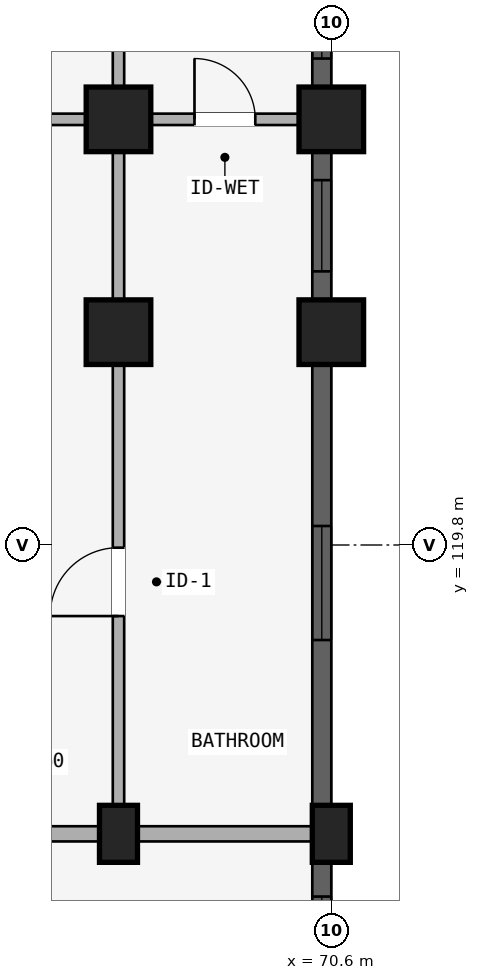
"""IFC4 building model, lengths in metres.
Left out: names, types, materials, properties, quantities, classifications, styles, units other than length and angle.
Written with IfcOpenShell. Run it as: python <this file> out.ifc"""

import sys

from ifc_helpers import new_model, si_unit, direction, frame, frame_2d, origin, origin_2d, place, context, subcontext, project, spatial, rectangle, extrude, element, fill, save


model = new_model("IFC4")
c1 = context("Model", 3, precision=1e-05, world=origin(), true_north=direction((0.0, 1.0)))
c2 = subcontext(c1, "Body", "Model", "MODEL_VIEW")
j1 = project(units=[si_unit("LENGTHUNIT", "METRE"), si_unit("PLANEANGLEUNIT", "RADIAN")], contexts=[c1])
p1 = place(None, origin())
s1 = spatial("IfcSite", under=j1, at=p1, CompositionType="ELEMENT")
p2 = place(p1, origin())
s2 = spatial("IfcBuilding", under=s1, at=p2, CompositionType="ELEMENT")
p3 = place(p2, frame((0.0, 0.0, 4.5)))
s3 = spatial("IfcBuildingStorey", under=s2, at=p3, CompositionType="ELEMENT", Elevation=4.5)
p4 = place(p3, frame((67.8, 116.0, 0.0), z_axis=(0.0, 0.0, 1.0), x_axis=(1.0, 0.0, 0.0)))
e1 = element("IfcColumn", 1, at=p4, inside=s3, PredefinedType="COLUMN", context=c2, shape_type="SweptSolid", body=[
    extrude(rectangle(XDim=0.5, YDim=0.75, at=origin_2d()), origin(), (0.0, 0.0, 1.0), 3.98),
])
for number, where, z_axis, x_axis in (
    (2, (67.8, 122.6, 0.0), (0.0, 0.0, 1.0), (1.0, 0.0, 0.0)),
    (3, (67.8, 125.4, 0.0), (0.0, 0.0, 1.0), (1.0, 0.0, 0.0)),
):
    element("IfcColumn", number, at=place(p3, frame(where, z_axis=z_axis, x_axis=x_axis)), inside=s3, PredefinedType="COLUMN", context=c2, shape_type="SweptSolid", body=[
        extrude(rectangle(XDim=0.85, YDim=0.85, at=origin_2d()), origin(), (0.0, 0.0, 1.0), 3.98),
    ])
p5 = place(p3, frame((70.6, 116.0, 0.0), z_axis=(0.0, 0.0, 1.0), x_axis=(1.0, 0.0, 0.0)))
e4 = element("IfcColumn", 4, at=p5, inside=s3, PredefinedType="COLUMN", context=c2, shape_type="SweptSolid", body=[
    extrude(rectangle(XDim=0.5, YDim=0.75, at=origin_2d()), origin(), (0.0, 0.0, 1.0), 3.98),
])
for number, where, z_axis, x_axis in (
    (5, (70.6, 122.6, 0.0), (0.0, 0.0, 1.0), (1.0, 0.0, 0.0)),
    (6, (70.6, 125.4, 0.0), (0.0, 0.0, 1.0), (1.0, 0.0, 0.0)),
):
    element("IfcColumn", number, at=place(p3, frame(where, z_axis=z_axis, x_axis=x_axis)), inside=s3, PredefinedType="COLUMN", context=c2, shape_type="SweptSolid", body=[
        extrude(rectangle(XDim=0.85, YDim=0.85, at=origin_2d()), origin(), (0.0, 0.0, 1.0), 3.98),
    ])
p6 = place(p3, frame((65.0, 116.0, 0.0), z_axis=(0.0, 0.0, 1.0), x_axis=(1.0, 0.0, 0.0)))
e7 = element("IfcWall", 7, at=p6, inside=s3, PredefinedType="STANDARD", context=c2, shape_type="SweptSolid", body=[
    extrude(rectangle(XDim=2.8, YDim=0.2, at=frame_2d((1.4, 0.0))), origin(), (0.0, 0.0, 1.0), 3.322),
])
p7 = place(p6, frame((0.9, 0.0, 0.0)))
e8 = element("IfcOpeningElement", 8, at=p7, cuts=e7, PredefinedType="OPENING", context=c2, shape_type="SweptSolid", body=[
    extrude(rectangle(XDim=1.0, YDim=2.15, at=frame_2d((0.5, 1.075))), frame((0.0, 0.11, 0.0), z_axis=(0.0, -1.0, 0.0), x_axis=(1.0, 0.0, 0.0)), (0.0, 0.0, 1.0), 0.22),
])
p8 = place(p3, frame((65.08, 125.4, 0.0), z_axis=(0.0, 0.0, 1.0), x_axis=(1.0, 0.0, 0.0)))
e9 = element("IfcWall", 9, at=p8, inside=s3, PredefinedType="PLUMBINGWALL", context=c2, shape_type="SweptSolid", body=[
    extrude(rectangle(XDim=2.64, YDim=0.15, at=frame_2d((1.32, 0.0))), origin(), (0.0, 0.0, 1.0), 3.322),
])
p9 = place(p8, frame((0.87, 0.0, 0.0)))
e10 = element("IfcOpeningElement", 10, at=p9, cuts=e9, PredefinedType="OPENING", context=c2, shape_type="SweptSolid", body=[
    extrude(rectangle(XDim=0.9, YDim=2.1, at=frame_2d((0.45, 1.05))), frame((0.0, 0.085, 0.0), z_axis=(0.0, -1.0, 0.0), x_axis=(1.0, 0.0, 0.0)), (0.0, 0.0, 1.0), 0.17),
])
p10 = place(p3, frame((67.8, 116.0, 0.0), z_axis=(0.0, 0.0, 1.0), x_axis=(1.0, 0.0, 0.0)))
e11 = element("IfcWall", 11, at=p10, inside=s3, PredefinedType="STANDARD", context=c2, shape_type="SweptSolid", body=[
    extrude(rectangle(XDim=2.8, YDim=0.2, at=frame_2d((1.4, 0.0))), origin(), (0.0, 0.0, 1.0), 3.322),
])
p11 = place(p3, frame((67.88, 125.4, 0.0), z_axis=(0.0, 0.0, 1.0), x_axis=(1.0, 0.0, 0.0)))
e12 = element("IfcWall", 12, at=p11, inside=s3, PredefinedType="PLUMBINGWALL", context=c2, shape_type="SweptSolid", body=[
    extrude(rectangle(XDim=2.64, YDim=0.15, at=frame_2d((1.32, 0.0))), origin(), (0.0, 0.0, 1.0), 3.322),
])
p12 = place(p11, frame((0.92, 0.0, 0.0)))
e13 = element("IfcOpeningElement", 13, at=p12, cuts=e12, PredefinedType="OPENING", context=c2, shape_type="SweptSolid", body=[
    extrude(rectangle(XDim=0.8, YDim=2.1, at=frame_2d((0.4, 1.05))), frame((0.0, 0.085, 0.0), z_axis=(0.0, -1.0, 0.0), x_axis=(1.0, 0.0, 0.0)), (0.0, 0.0, 1.0), 0.17),
])
p13 = place(p3, frame((67.8, 116.05, 0.0), z_axis=(0.0, 0.0, 1.0), x_axis=(0.0, 1.0, 0.0)))
e14 = element("IfcWall", 14, at=p13, inside=s3, PredefinedType="PARTITIONING", context=c2, shape_type="SweptSolid", body=[
    extrude(rectangle(XDim=6.53, YDim=0.15, at=frame_2d((3.265, 0.0))), origin(), (0.0, 0.0, 1.0), 3.322),
])
p14 = place(p13, frame((2.815, 0.0, 0.0)))
e15 = element("IfcOpeningElement", 15, at=p14, cuts=e14, PredefinedType="OPENING", context=c2, shape_type="SweptSolid", body=[
    extrude(rectangle(XDim=0.9, YDim=2.1, at=frame_2d((0.45, 1.05))), frame((0.0, 0.085, 0.0), z_axis=(0.0, -1.0, 0.0), x_axis=(1.0, 0.0, 0.0)), (0.0, 0.0, 1.0), 0.17),
])
p15 = place(p3, frame((67.8, 122.7, 0.0), z_axis=(0.0, 0.0, 1.0), x_axis=(0.0, 1.0, 0.0)))
e16 = element("IfcWall", 16, at=p15, inside=s3, PredefinedType="PARTITIONING", context=c2, shape_type="SweptSolid", body=[
    extrude(rectangle(XDim=10.82, YDim=0.15, at=frame_2d((5.41, 0.0))), origin(), (0.0, 0.0, 1.0), 3.322),
])
p16 = place(p15, frame((3.7, 0.0, 0.0)))
e17 = element("IfcOpeningElement", 17, at=p16, cuts=e16, PredefinedType="OPENING", context=c2, shape_type="SweptSolid", body=[
    extrude(rectangle(XDim=0.8, YDim=2.1, at=frame_2d((0.4, 1.05))), frame((0.0, 0.085, 0.0), z_axis=(0.0, -1.0, 0.0), x_axis=(1.0, 0.0, 0.0)), (0.0, 0.0, 1.0), 0.17),
])
p17 = place(p3, frame((70.475, 113.979, 0.0), z_axis=(0.0, 0.0, 1.0), x_axis=(0.0, 1.0, 0.0)))
e18 = element("IfcWall", 18, at=p17, inside=s3, PredefinedType="STANDARD", context=c2, shape_type="SweptSolid", body=[
    extrude(rectangle(XDim=1.643, YDim=0.25, at=frame_2d((0.822, 0.0))), origin(), (0.0, 0.0, 1.0), 3.322),
])
p18 = place(p17, frame((0.447, 0.0, 0.88)))
e19 = element("IfcOpeningElement", 19, at=p18, cuts=e18, PredefinedType="OPENING", context=c2, shape_type="SweptSolid", body=[
    extrude(rectangle(XDim=0.75, YDim=1.05, at=frame_2d((0.375, 0.525))), frame((0.0, 0.135, 0.0), z_axis=(0.0, -1.0, 0.0), x_axis=(1.0, 0.0, 0.0)), (0.0, 0.0, 1.0), 0.27),
])
p19 = place(p3, frame((70.475, 116.378, 0.0), z_axis=(0.0, 0.0, 1.0), x_axis=(0.0, 1.0, 0.0)))
e20 = element("IfcWall", 20, at=p19, inside=s3, PredefinedType="STANDARD", context=c2, shape_type="SweptSolid", body=[
    extrude(rectangle(XDim=5.802, YDim=0.25, at=frame_2d((2.901, 0.0))), origin(), (0.0, 0.0, 1.0), 3.322),
])
p20 = place(p19, frame((2.171, 0.0, 0.88)))
e21 = element("IfcOpeningElement", 21, at=p20, cuts=e20, PredefinedType="OPENING", context=c2, shape_type="SweptSolid", body=[
    extrude(rectangle(XDim=1.5, YDim=1.65, at=frame_2d((0.75, 0.825))), frame((0.0, 0.135, 0.0), z_axis=(0.0, -1.0, 0.0), x_axis=(1.0, 0.0, 0.0)), (0.0, 0.0, 1.0), 0.27),
])
p21 = place(p3, frame((70.475, 123.02, 0.0), z_axis=(0.0, 0.0, 1.0), x_axis=(0.0, 1.0, 0.0)))
e22 = element("IfcWall", 22, at=p21, inside=s3, PredefinedType="STANDARD", context=c2, shape_type="SweptSolid", body=[
    extrude(rectangle(XDim=1.96, YDim=0.25, at=frame_2d((0.98, 0.0))), origin(), (0.0, 0.0, 1.0), 3.322),
])
p22 = place(p21, frame((0.38, 0.0, 0.88)))
e23 = element("IfcOpeningElement", 23, at=p22, cuts=e22, PredefinedType="OPENING", context=c2, shape_type="SweptSolid", body=[
    extrude(rectangle(XDim=1.2, YDim=1.5, at=frame_2d((0.6, 0.75))), frame((0.0, 0.135, 0.0), z_axis=(0.0, -1.0, 0.0), x_axis=(1.0, 0.0, 0.0)), (0.0, 0.0, 1.0), 0.27),
])
p23 = place(p3, frame((70.475, 125.82, 0.0), z_axis=(0.0, 0.0, 1.0), x_axis=(0.0, 1.0, 0.0)))
e24 = element("IfcWall", 24, at=p23, inside=s3, PredefinedType="STANDARD", context=c2, shape_type="SweptSolid", body=[
    extrude(rectangle(XDim=1.96, YDim=0.25, at=frame_2d((0.98, 0.0))), origin(), (0.0, 0.0, 1.0), 3.322),
])
p24 = place(p23, frame((0.38, 0.0, 0.88)))
e25 = element("IfcOpeningElement", 25, at=p24, cuts=e24, PredefinedType="OPENING", context=c2, shape_type="SweptSolid", body=[
    extrude(rectangle(XDim=1.2, YDim=1.5, at=frame_2d((0.6, 0.75))), frame((0.0, 0.135, 0.0), z_axis=(0.0, -1.0, 0.0), x_axis=(1.0, 0.0, 0.0)), (0.0, 0.0, 1.0), 0.27),
])
p25 = place(p18, origin())
e26 = element("IfcWindow", 26, at=p25, inside=s3, PartitioningType="SINGLE_PANEL", PredefinedType="WINDOW", context=c2, shape_type="SweptSolid", body=[
    extrude(rectangle(XDim=0.75, YDim=1.05, at=frame_2d((0.375, 0.525))), frame((0.0, 0.03, 0.0), z_axis=(0.0, -1.0, 0.0), x_axis=(1.0, 0.0, 0.0)), (0.0, 0.0, 1.0), 0.06),
])
fill(e19, e26)
p26 = place(p20, origin())
e27 = element("IfcWindow", 27, at=p26, inside=s3, PartitioningType="DOUBLE_PANEL_VERTICAL", PredefinedType="WINDOW", context=c2, shape_type="SweptSolid", body=[
    extrude(rectangle(XDim=1.5, YDim=1.65, at=frame_2d((0.75, 0.825))), frame((0.0, 0.03, 0.0), z_axis=(0.0, -1.0, 0.0), x_axis=(1.0, 0.0, 0.0)), (0.0, 0.0, 1.0), 0.06),
])
fill(e21, e27)
p27 = place(p22, origin())
e28 = element("IfcWindow", 28, at=p27, inside=s3, PartitioningType="SINGLE_PANEL", PredefinedType="WINDOW", context=c2, shape_type="SweptSolid", body=[
    extrude(rectangle(XDim=1.2, YDim=1.5, at=frame_2d((0.6, 0.75))), frame((0.0, 0.03, 0.0), z_axis=(0.0, -1.0, 0.0), x_axis=(1.0, 0.0, 0.0)), (0.0, 0.0, 1.0), 0.06),
])
fill(e23, e28)
p28 = place(p24, origin())
e29 = element("IfcWindow", 29, at=p28, inside=s3, PartitioningType="SINGLE_PANEL", PredefinedType="WINDOW", context=c2, shape_type="SweptSolid", body=[
    extrude(rectangle(XDim=1.2, YDim=1.5, at=frame_2d((0.6, 0.75))), frame((0.0, 0.03, 0.0), z_axis=(0.0, -1.0, 0.0), x_axis=(1.0, 0.0, 0.0)), (0.0, 0.0, 1.0), 0.06),
])
fill(e25, e29)
p29 = place(p12, origin())
e30 = element("IfcDoor", 30, at=p29, inside=s3, OperationType="SINGLE_SWING_LEFT", PredefinedType="DOOR", context=c2, shape_type="SweptSolid", body=[
    extrude(rectangle(XDim=0.8, YDim=2.1, at=frame_2d((0.4, 1.05))), frame((0.0, 0.025, 0.0), z_axis=(0.0, -1.0, 0.0), x_axis=(1.0, 0.0, 0.0)), (0.0, 0.0, 1.0), 0.05),
])
fill(e13, e30)
p30 = place(p14, origin())
e31 = element("IfcDoor", 31, at=p30, inside=s3, OperationType="SINGLE_SWING_LEFT", PredefinedType="DOOR", context=c2, shape_type="SweptSolid", body=[
    extrude(rectangle(XDim=0.9, YDim=2.1, at=frame_2d((0.45, 1.05))), frame((0.0, 0.025, 0.0), z_axis=(0.0, -1.0, 0.0), x_axis=(1.0, 0.0, 0.0)), (0.0, 0.0, 1.0), 0.05),
])
fill(e15, e31)
save(model, sys.argv[1])
